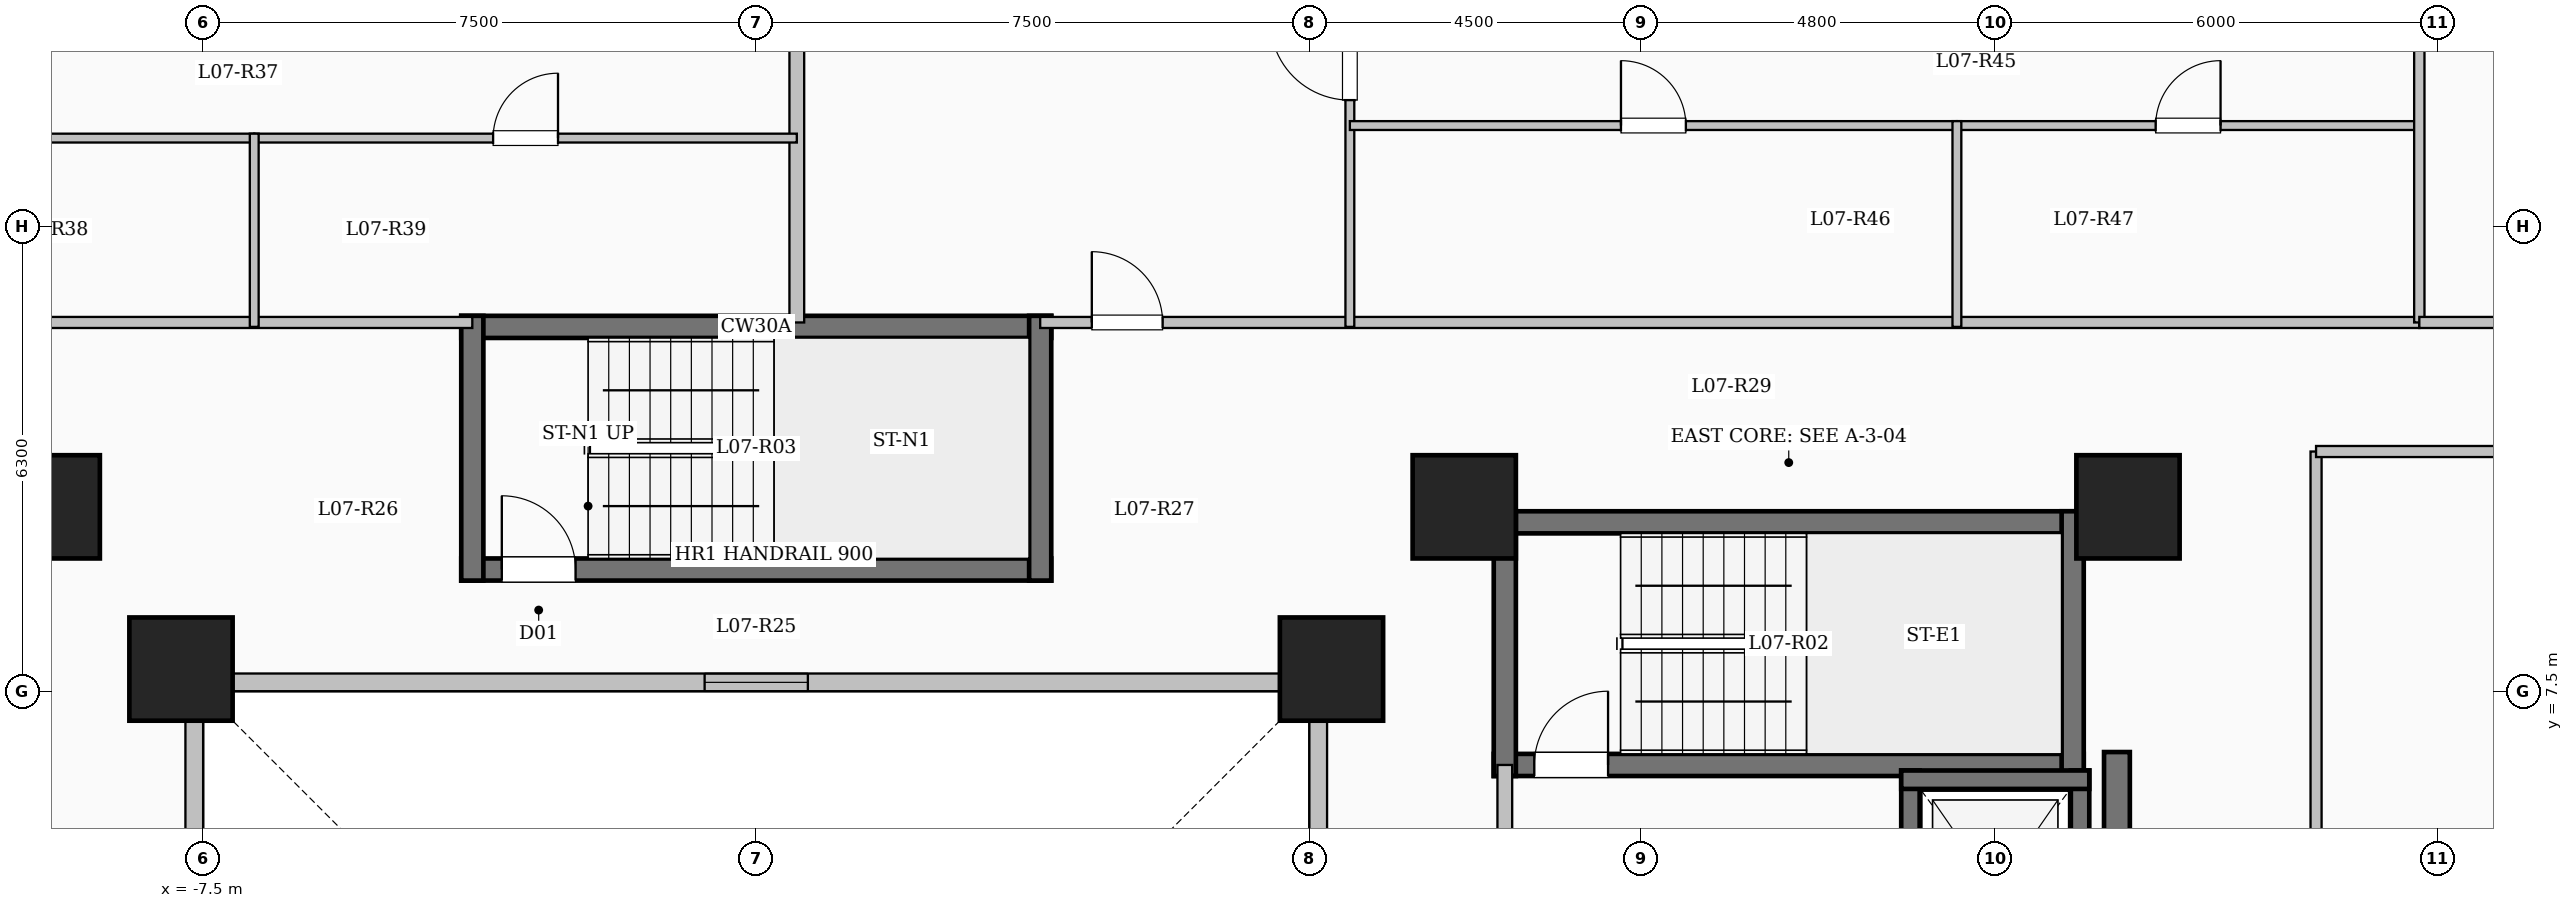
"""IFC4 building model, lengths in metres.
Left out: names, types, materials, properties, quantities, classifications, styles, units other than length and angle.
Written with IfcOpenShell. Run it as: python <this file> out.ifc"""

import sys

from ifc_helpers import new_model, si_unit, direction, frame, frame_2d, origin, origin_2d, place, context, subcontext, project, spatial, rectangle, extrude, element, fill, save


model = new_model("IFC4")
c1 = context("Model", 3, precision=1e-05, world=origin(), true_north=direction((0.0, 1.0)))
c2 = subcontext(c1, "Body", "Model", "MODEL_VIEW")
j1 = project(units=[si_unit("LENGTHUNIT", "METRE"), si_unit("PLANEANGLEUNIT", "RADIAN")], contexts=[c1])
p1 = place(None, origin())
s1 = spatial("IfcSite", under=j1, at=p1, CompositionType="ELEMENT")
p2 = place(p1, origin())
s2 = spatial("IfcBuilding", under=s1, at=p2, CompositionType="ELEMENT")
p3 = place(p2, frame((0.0, 0.0, 30.7)))
s3 = spatial("IfcBuildingStorey", under=s2, at=p3, CompositionType="ELEMENT", Elevation=30.7)
for number, where, z_axis, x_axis in (
    (1, (-7.8, 7.8, 0.0), (0.0, 0.0, 1.0), (1.0, 0.0, 0.0)),
    (2, (7.8, 7.8, 0.0), (0.0, 0.0, 1.0), (1.0, 0.0, 0.0)),
    (3, (-9.6, 10.0, 0.0), (0.0, 0.0, 1.0), (1.0, 0.0, 0.0)),
    (4, (9.6, 10.0, 0.0), (0.0, 0.0, 1.0), (1.0, 0.0, 0.0)),
    (5, (18.6, 10.0, 0.0), (0.0, 0.0, 1.0), (1.0, 0.0, 0.0)),
):
    element("IfcColumn", number, at=place(p3, frame(where, z_axis=z_axis, x_axis=x_axis)), inside=s3, PredefinedType="COLUMN", context=c2, shape_type="SweptSolid", body=[
        extrude(rectangle(XDim=1.4, YDim=1.4, at=origin_2d()), origin(), (0.0, 0.0, 1.0), 3.35),
    ])
p4 = place(p3, frame((7.62, -7.62, 0.0), z_axis=(0.0, 0.0, 1.0), x_axis=(0.0, 1.0, 0.0)))
e6 = element("IfcWall", 6, at=p4, inside=s3, PredefinedType="SOLIDWALL", context=c2, shape_type="SweptSolid", body=[
    extrude(rectangle(XDim=15.24, YDim=0.24, at=frame_2d((7.62, 0.0))), origin(), (0.0, 0.0, 1.0), 3.1),
])
p5 = place(p4, frame((6.92, 0.0, 0.95)))
e7 = element("IfcOpeningElement", 7, at=p5, cuts=e6, PredefinedType="OPENING", context=c2, shape_type="SweptSolid", body=[
    extrude(rectangle(XDim=1.4, YDim=1.5, at=frame_2d((0.7, 0.75))), frame((0.0, 0.13, 0.0), z_axis=(0.0, -1.0, 0.0), x_axis=(1.0, 0.0, 0.0)), (0.0, 0.0, 1.0), 0.26),
])
p6 = place(p3, frame((7.62, 7.62, 0.0), z_axis=(0.0, 0.0, 1.0), x_axis=(-1.0, 0.0, 0.0)))
e8 = element("IfcWall", 8, at=p6, inside=s3, PredefinedType="SOLIDWALL", context=c2, shape_type="SweptSolid", body=[
    extrude(rectangle(XDim=15.24, YDim=0.24, at=frame_2d((7.62, 0.0))), origin(), (0.0, 0.0, 1.0), 3.1),
])
p7 = place(p6, frame((6.92, 0.0, 0.95)))
e9 = element("IfcOpeningElement", 9, at=p7, cuts=e8, PredefinedType="OPENING", context=c2, shape_type="SweptSolid", body=[
    extrude(rectangle(XDim=1.4, YDim=1.5, at=frame_2d((0.7, 0.75))), frame((0.0, 0.13, 0.0), z_axis=(0.0, -1.0, 0.0), x_axis=(1.0, 0.0, 0.0)), (0.0, 0.0, 1.0), 0.26),
])
p8 = place(p3, frame((-7.62, 7.62, 0.0), z_axis=(0.0, 0.0, 1.0), x_axis=(0.0, -1.0, 0.0)))
e10 = element("IfcWall", 10, at=p8, inside=s3, PredefinedType="SOLIDWALL", context=c2, shape_type="SweptSolid", body=[
    extrude(rectangle(XDim=15.24, YDim=0.24, at=frame_2d((7.62, 0.0))), origin(), (0.0, 0.0, 1.0), 3.1),
])
p9 = place(p8, frame((6.92, 0.0, 0.95)))
e11 = element("IfcOpeningElement", 11, at=p9, cuts=e10, PredefinedType="OPENING", context=c2, shape_type="SweptSolid", body=[
    extrude(rectangle(XDim=1.4, YDim=1.5, at=frame_2d((0.7, 0.75))), frame((0.0, 0.13, 0.0), z_axis=(0.0, -1.0, 0.0), x_axis=(1.0, 0.0, 0.0)), (0.0, 0.0, 1.0), 0.26),
])
p10 = place(p3, frame((10.0, 9.79, 0.0), z_axis=(0.0, 0.0, 1.0), x_axis=(1.0, 0.0, 0.0)))
e12 = element("IfcWall", 12, at=p10, inside=s3, PredefinedType="SHEAR", context=c2, shape_type="SweptSolid", body=[
    extrude(rectangle(XDim=8.0, YDim=0.3, at=frame_2d((4.0, 0.0))), origin(), (0.0, 0.0, 1.0), 3.35),
])
p11 = place(p3, frame((10.0, 6.5, 0.0), z_axis=(0.0, 0.0, 1.0), x_axis=(1.0, 0.0, 0.0)))
e13 = element("IfcWall", 13, at=p11, inside=s3, PredefinedType="SHEAR", context=c2, shape_type="SweptSolid", body=[
    extrude(rectangle(XDim=8.0, YDim=0.3, at=frame_2d((4.0, 0.0))), origin(), (0.0, 0.0, 1.0), 3.35),
])
p12 = place(p11, frame((0.55, 0.0, 0.0)))
e14 = element("IfcOpeningElement", 14, at=p12, cuts=e13, PredefinedType="OPENING", context=c2, shape_type="SweptSolid", body=[
    extrude(rectangle(XDim=1.0, YDim=2.15, at=frame_2d((0.5, 1.075))), frame((0.0, 0.16, 0.0), z_axis=(0.0, -1.0, 0.0), x_axis=(1.0, 0.0, 0.0)), (0.0, 0.0, 1.0), 0.32),
])
for number, where, z_axis, x_axis in (
    (15, (10.15, 6.35, 0.0), (0.0, 0.0, 1.0), (0.0, 1.0, 0.0)),
    (16, (17.85, 6.35, 0.0), (0.0, 0.0, 1.0), (0.0, 1.0, 0.0)),
):
    element("IfcWall", number, at=place(p3, frame(where, z_axis=z_axis, x_axis=x_axis)), inside=s3, PredefinedType="SHEAR", context=c2, shape_type="SweptSolid", body=[
        extrude(rectangle(XDim=3.59, YDim=0.3, at=frame_2d((1.795, 0.0))), origin(), (0.0, 0.0, 1.0), 3.35),
    ])
p13 = place(p3, frame((-4.0, 12.44, 0.0), z_axis=(0.0, 0.0, 1.0), x_axis=(1.0, 0.0, 0.0)))
e17 = element("IfcWall", 17, at=p13, inside=s3, PredefinedType="SHEAR", context=c2, shape_type="SweptSolid", body=[
    extrude(rectangle(XDim=8.0, YDim=0.3, at=frame_2d((4.0, 0.0))), origin(), (0.0, 0.0, 1.0), 3.35),
])
p14 = place(p3, frame((-4.0, 9.15, 0.0), z_axis=(0.0, 0.0, 1.0), x_axis=(1.0, 0.0, 0.0)))
e18 = element("IfcWall", 18, at=p14, inside=s3, PredefinedType="SHEAR", context=c2, shape_type="SweptSolid", body=[
    extrude(rectangle(XDim=8.0, YDim=0.3, at=frame_2d((4.0, 0.0))), origin(), (0.0, 0.0, 1.0), 3.35),
])
p15 = place(p14, frame((0.55, 0.0, 0.0)))
e19 = element("IfcOpeningElement", 19, at=p15, cuts=e18, PredefinedType="OPENING", context=c2, shape_type="SweptSolid", body=[
    extrude(rectangle(XDim=1.0, YDim=2.15, at=frame_2d((0.5, 1.075))), frame((0.0, 0.16, 0.0), z_axis=(0.0, -1.0, 0.0), x_axis=(1.0, 0.0, 0.0)), (0.0, 0.0, 1.0), 0.32),
])
for number, where, z_axis, x_axis in (
    (20, (-3.85, 9.0, 0.0), (0.0, 0.0, 1.0), (0.0, 1.0, 0.0)),
    (21, (3.85, 9.0, 0.0), (0.0, 0.0, 1.0), (0.0, 1.0, 0.0)),
):
    element("IfcWall", number, at=place(p3, frame(where, z_axis=z_axis, x_axis=x_axis)), inside=s3, PredefinedType="SHEAR", context=c2, shape_type="SweptSolid", body=[
        extrude(rectangle(XDim=3.59, YDim=0.3, at=frame_2d((1.795, 0.0))), origin(), (0.0, 0.0, 1.0), 3.35),
    ])
p16 = place(p3, frame((10.15, 3.25, 0.0), z_axis=(0.0, 0.0, 1.0), x_axis=(0.0, 1.0, 0.0)))
e22 = element("IfcWall", 22, at=p16, inside=s3, PredefinedType="SOLIDWALL", context=c2, shape_type="SweptSolid", body=[
    extrude(rectangle(XDim=3.25, YDim=0.2, at=frame_2d((1.625, 0.0))), origin(), (0.0, 0.0, 1.0), 3.1),
])
p17 = place(p16, frame((1.1, 0.0, 0.0)))
e23 = element("IfcOpeningElement", 23, at=p17, cuts=e22, PredefinedType="OPENING", context=c2, shape_type="SweptSolid", body=[
    extrude(rectangle(XDim=1.02, YDim=2.15, at=frame_2d((0.51, 1.075))), frame((0.0, 0.11, 0.0), z_axis=(0.0, -1.0, 0.0), x_axis=(1.0, 0.0, 0.0)), (0.0, 0.0, 1.0), 0.22),
])
p18 = place(p3, frame((15.65, 3.175, 0.0), z_axis=(0.0, 0.0, 1.0), x_axis=(0.0, 1.0, 0.0)))
e24 = element("IfcWall", 24, at=p18, inside=s3, PredefinedType="SHEAR", context=c2, shape_type="SweptSolid", body=[
    extrude(rectangle(XDim=3.25, YDim=0.25, at=frame_2d((1.625, 0.0))), origin(), (0.0, 0.0, 1.0), 3.35),
])
p19 = place(p18, frame((1.075, 0.0, 0.0)))
e25 = element("IfcOpeningElement", 25, at=p19, cuts=e24, PredefinedType="OPENING", context=c2, shape_type="SweptSolid", body=[
    extrude(rectangle(XDim=1.1, YDim=2.15, at=frame_2d((0.55, 1.075))), frame((0.0, 0.135, 0.0), z_axis=(0.0, -1.0, 0.0), x_axis=(1.0, 0.0, 0.0)), (0.0, 0.0, 1.0), 0.27),
])
p20 = place(p3, frame((17.95, 3.175, 0.0), z_axis=(0.0, 0.0, 1.0), x_axis=(0.0, 1.0, 0.0)))
e26 = element("IfcWall", 26, at=p20, inside=s3, PredefinedType="SHEAR", context=c2, shape_type="SweptSolid", body=[
    extrude(rectangle(XDim=3.25, YDim=0.25, at=frame_2d((1.625, 0.0))), origin(), (0.0, 0.0, 1.0), 3.35),
])
p21 = place(p3, frame((15.525, 6.3, 0.0), z_axis=(0.0, 0.0, 1.0), x_axis=(1.0, 0.0, 0.0)))
e27 = element("IfcWall", 27, at=p21, inside=s3, PredefinedType="SHEAR", context=c2, shape_type="SweptSolid", body=[
    extrude(rectangle(XDim=2.55, YDim=0.25, at=frame_2d((1.275, 0.0))), origin(), (0.0, 0.0, 1.0), 3.35),
])
p22 = place(p3, frame((18.45, -7.375, 0.0), z_axis=(0.0, 0.0, 1.0), x_axis=(0.0, 1.0, 0.0)))
e28 = element("IfcWall", 28, at=p22, inside=s3, PredefinedType="SHEAR", context=c2, shape_type="SweptSolid", body=[
    extrude(rectangle(XDim=14.05, YDim=0.35, at=frame_2d((7.025, 0.0))), origin(), (0.0, 0.0, 1.0), 3.35),
])
p23 = place(p3, frame((-22.55, 12.5, 0.0), z_axis=(0.0, 0.0, 1.0), x_axis=(1.0, 0.0, 0.0)))
e29 = element("IfcWall", 29, at=p23, inside=s3, PredefinedType="PARTITIONING", context=c2, shape_type="SweptSolid", body=[
    extrude(rectangle(XDim=18.7, YDim=0.15, at=frame_2d((9.35, 0.0))), origin(), (0.0, 0.0, 1.0), 3.1),
])
p24 = place(p23, frame((0.7, 0.0, 0.0)))
e30 = element("IfcOpeningElement", 30, at=p24, cuts=e29, PredefinedType="OPENING", context=c2, shape_type="SweptSolid", body=[
    extrude(rectangle(XDim=0.96, YDim=2.15, at=frame_2d((0.48, 1.075))), frame((0.0, 0.085, 0.0), z_axis=(0.0, -1.0, 0.0), x_axis=(1.0, 0.0, 0.0)), (0.0, 0.0, 1.0), 0.17),
])
p25 = place(p3, frame((3.85, 12.5, 0.0), z_axis=(0.0, 0.0, 1.0), x_axis=(1.0, 0.0, 0.0)))
e31 = element("IfcWall", 31, at=p25, inside=s3, PredefinedType="PARTITIONING", context=c2, shape_type="SweptSolid", body=[
    extrude(rectangle(XDim=18.7, YDim=0.15, at=frame_2d((9.35, 0.0))), origin(), (0.0, 0.0, 1.0), 3.1),
])
p26 = place(p25, frame((0.7, 0.0, 0.0)))
e32 = element("IfcOpeningElement", 32, at=p26, cuts=e31, PredefinedType="OPENING", context=c2, shape_type="SweptSolid", body=[
    extrude(rectangle(XDim=0.96, YDim=2.15, at=frame_2d((0.48, 1.075))), frame((0.0, 0.085, 0.0), z_axis=(0.0, -1.0, 0.0), x_axis=(1.0, 0.0, 0.0)), (0.0, 0.0, 1.0), 0.17),
])
p27 = place(p3, frame((21.15, -7.25, 0.0), z_axis=(0.0, 0.0, 1.0), x_axis=(0.0, 1.0, 0.0)))
e33 = element("IfcWall", 33, at=p27, inside=s3, PredefinedType="PARTITIONING", context=c2, shape_type="SweptSolid", body=[
    extrude(rectangle(XDim=18.0, YDim=0.15, at=frame_2d((9.0, 0.0))), origin(), (0.0, 0.0, 1.0), 2.585),
])
p28 = place(p3, frame((0.55, 12.5, 0.0), z_axis=(0.0, 0.0, 1.0), x_axis=(0.0, 1.0, 0.0)))
e34 = element("IfcWall", 34, at=p28, inside=s3, PredefinedType="SOLIDWALL", context=c2, shape_type="SweptSolid", body=[
    extrude(rectangle(XDim=12.58, YDim=0.2, at=frame_2d((6.29, 0.0))), origin(), (0.0, 0.0, 1.0), 3.1),
])
p29 = place(p3, frame((-15.035, 15.0, 0.0), z_axis=(0.0, 0.0, 1.0), x_axis=(1.0, 0.0, 0.0)))
e35 = element("IfcWall", 35, at=p29, inside=s3, PredefinedType="PARTITIONING", context=c2, shape_type="SweptSolid", body=[
    extrude(rectangle(XDim=8.228, YDim=0.12, at=frame_2d((4.114, 0.0))), origin(), (0.0, 0.0, 1.0), 2.585),
])
p30 = place(p29, frame((3.674, 0.0, 0.0)))
e36 = element("IfcOpeningElement", 36, at=p30, cuts=e35, PredefinedType="OPENING", context=c2, shape_type="SweptSolid", body=[
    extrude(rectangle(XDim=0.88, YDim=2.1, at=frame_2d((0.44, 1.05))), frame((0.0, 0.07, 0.0), z_axis=(0.0, -1.0, 0.0), x_axis=(1.0, 0.0, 0.0)), (0.0, 0.0, 1.0), 0.14),
])
p31 = place(p3, frame((-6.807, 15.0, 0.0), z_axis=(0.0, 0.0, 1.0), x_axis=(1.0, 0.0, 0.0)))
e37 = element("IfcWall", 37, at=p31, inside=s3, PredefinedType="PARTITIONING", context=c2, shape_type="SweptSolid", body=[
    extrude(rectangle(XDim=7.357, YDim=0.12, at=frame_2d((3.678, 0.0))), origin(), (0.0, 0.0, 1.0), 2.585),
])
p32 = place(p31, frame((3.239, 0.0, 0.0)))
e38 = element("IfcOpeningElement", 38, at=p32, cuts=e37, PredefinedType="OPENING", context=c2, shape_type="SweptSolid", body=[
    extrude(rectangle(XDim=0.88, YDim=2.1, at=frame_2d((0.44, 1.05))), frame((0.0, 0.07, 0.0), z_axis=(0.0, -1.0, 0.0), x_axis=(1.0, 0.0, 0.0)), (0.0, 0.0, 1.0), 0.14),
])
p33 = place(p3, frame((-6.807, 12.44, 0.0), z_axis=(0.0, 0.0, 1.0), x_axis=(0.0, 1.0, 0.0)))
e39 = element("IfcWall", 39, at=p33, inside=s3, PredefinedType="PARTITIONING", context=c2, shape_type="SweptSolid", body=[
    extrude(rectangle(XDim=2.62, YDim=0.12, at=frame_2d((1.31, 0.0))), origin(), (0.0, 0.0, 1.0), 3.1),
])
p34 = place(p3, frame((8.049, 12.44, 0.0), z_axis=(0.0, 0.0, 1.0), x_axis=(0.0, 1.0, 0.0)))
e40 = element("IfcWall", 40, at=p34, inside=s3, PredefinedType="PARTITIONING", context=c2, shape_type="SweptSolid", body=[
    extrude(rectangle(XDim=11.888, YDim=0.12, at=frame_2d((5.944, 0.0))), origin(), (0.0, 0.0, 1.0), 2.435),
])
p35 = place(p34, frame((3.075, 0.0, 0.0)))
e41 = element("IfcOpeningElement", 41, at=p35, cuts=e40, PredefinedType="OPENING", context=c2, shape_type="SweptSolid", body=[
    extrude(rectangle(XDim=1.08, YDim=2.15, at=frame_2d((0.54, 1.075))), frame((0.0, 0.07, 0.0), z_axis=(0.0, -1.0, 0.0), x_axis=(1.0, 0.0, 0.0)), (0.0, 0.0, 1.0), 0.14),
])
p36 = place(p3, frame((8.049, 15.17, 0.0), z_axis=(0.0, 0.0, 1.0), x_axis=(1.0, 0.0, 0.0)))
e42 = element("IfcWall", 42, at=p36, inside=s3, PredefinedType="PARTITIONING", context=c2, shape_type="SweptSolid", body=[
    extrude(rectangle(XDim=8.231, YDim=0.12, at=frame_2d((4.115, 0.0))), origin(), (0.0, 0.0, 1.0), 3.1),
])
p37 = place(p36, frame((3.676, 0.0, 0.0)))
e43 = element("IfcOpeningElement", 43, at=p37, cuts=e42, PredefinedType="OPENING", context=c2, shape_type="SweptSolid", body=[
    extrude(rectangle(XDim=0.88, YDim=2.1, at=frame_2d((0.44, 1.05))), frame((0.0, 0.07, 0.0), z_axis=(0.0, -1.0, 0.0), x_axis=(1.0, 0.0, 0.0)), (0.0, 0.0, 1.0), 0.14),
])
p38 = place(p3, frame((16.28, 15.17, 0.0), z_axis=(0.0, 0.0, 1.0), x_axis=(1.0, 0.0, 0.0)))
e44 = element("IfcWall", 44, at=p38, inside=s3, PredefinedType="PARTITIONING", context=c2, shape_type="SweptSolid", body=[
    extrude(rectangle(XDim=6.27, YDim=0.12, at=frame_2d((3.135, 0.0))), origin(), (0.0, 0.0, 1.0), 3.1),
])
p39 = place(p38, frame((2.695, 0.0, 0.0)))
e45 = element("IfcOpeningElement", 45, at=p39, cuts=e44, PredefinedType="OPENING", context=c2, shape_type="SweptSolid", body=[
    extrude(rectangle(XDim=0.88, YDim=2.1, at=frame_2d((0.44, 1.05))), frame((0.0, 0.07, 0.0), z_axis=(0.0, -1.0, 0.0), x_axis=(1.0, 0.0, 0.0)), (0.0, 0.0, 1.0), 0.14),
])
p40 = place(p3, frame((16.28, 12.44, 0.0), z_axis=(0.0, 0.0, 1.0), x_axis=(0.0, 1.0, 0.0)))
e46 = element("IfcWall", 46, at=p40, inside=s3, PredefinedType="PARTITIONING", context=c2, shape_type="SweptSolid", body=[
    extrude(rectangle(XDim=2.79, YDim=0.12, at=frame_2d((1.395, 0.0))), origin(), (0.0, 0.0, 1.0), 3.1),
])
p41 = place(p3, frame((21.15, 10.75, 0.0), z_axis=(0.0, 0.0, 1.0), x_axis=(1.0, 0.0, 0.0)))
e47 = element("IfcWall", 47, at=p41, inside=s3, PredefinedType="PARTITIONING", context=c2, shape_type="SweptSolid", body=[
    extrude(rectangle(XDim=7.53, YDim=0.15, at=frame_2d((3.765, 0.0))), origin(), (0.0, 0.0, 1.0), 3.1),
])
p42 = place(p3, frame((22.55, 12.5, 0.0), z_axis=(0.0, 0.0, 1.0), x_axis=(0.0, 1.0, 0.0)))
e48 = element("IfcWall", 48, at=p42, inside=s3, PredefinedType="PARTITIONING", context=c2, shape_type="SweptSolid", body=[
    extrude(rectangle(XDim=6.55, YDim=0.14, at=frame_2d((3.275, 0.0))), origin(), (0.0, 0.0, 1.0), 3.1),
])
p43 = place(p3, frame((22.55, 12.5, 0.0), z_axis=(0.0, 0.0, 1.0), x_axis=(1.0, 0.0, 0.0)))
e49 = element("IfcWall", 49, at=p43, inside=s3, PredefinedType="PARTITIONING", context=c2, shape_type="SweptSolid", body=[
    extrude(rectangle(XDim=6.13, YDim=0.15, at=frame_2d((3.065, 0.0))), origin(), (0.0, 0.0, 1.0), 3.1),
])
p44 = place(p43, frame((2.59, 0.0, 0.0)))
e50 = element("IfcOpeningElement", 50, at=p44, cuts=e49, PredefinedType="OPENING", context=c2, shape_type="SweptSolid", body=[
    extrude(rectangle(XDim=0.95, YDim=2.15, at=frame_2d((0.475, 1.075))), frame((0.0, 0.085, 0.0), z_axis=(0.0, -1.0, 0.0), x_axis=(1.0, 0.0, 0.0)), (0.0, 0.0, 1.0), 0.17),
])
p45 = place(p7, origin())
e51 = element("IfcWindow", 51, at=p45, inside=s3, PartitioningType="SINGLE_PANEL", PredefinedType="WINDOW", context=c2, shape_type="SweptSolid", body=[
    extrude(rectangle(XDim=1.4, YDim=1.5, at=frame_2d((0.7, 0.75))), frame((0.0, 0.03, 0.0), z_axis=(0.0, -1.0, 0.0), x_axis=(1.0, 0.0, 0.0)), (0.0, 0.0, 1.0), 0.06),
])
fill(e9, e51)
p46 = place(p12, origin())
e52 = element("IfcDoor", 52, at=p46, inside=s3, OperationType="SINGLE_SWING_RIGHT", PredefinedType="DOOR", context=c2, shape_type="SweptSolid", body=[
    extrude(rectangle(XDim=1.0, YDim=2.15, at=frame_2d((0.5, 1.075))), frame((0.0, 0.025, 0.0), z_axis=(0.0, -1.0, 0.0), x_axis=(1.0, 0.0, 0.0)), (0.0, 0.0, 1.0), 0.05),
])
fill(e14, e52)
p47 = place(p15, origin())
e53 = element("IfcDoor", 53, at=p47, inside=s3, OperationType="SINGLE_SWING_LEFT", PredefinedType="DOOR", context=c2, shape_type="SweptSolid", body=[
    extrude(rectangle(XDim=1.0, YDim=2.15, at=frame_2d((0.5, 1.075))), frame((0.0, 0.025, 0.0), z_axis=(0.0, -1.0, 0.0), x_axis=(1.0, 0.0, 0.0)), (0.0, 0.0, 1.0), 0.05),
])
fill(e19, e53)
p48 = place(p32, origin())
e54 = element("IfcDoor", 54, at=p48, inside=s3, OperationType="SINGLE_SWING_RIGHT", PredefinedType="DOOR", context=c2, shape_type="SweptSolid", body=[
    extrude(rectangle(XDim=0.88, YDim=2.1, at=frame_2d((0.44, 1.05))), frame((0.0, 0.025, 0.0), z_axis=(0.0, -1.0, 0.0), x_axis=(1.0, 0.0, 0.0)), (0.0, 0.0, 1.0), 0.05),
])
fill(e38, e54)
p49 = place(p26, origin())
e55 = element("IfcDoor", 55, at=p49, inside=s3, OperationType="SINGLE_SWING_LEFT", PredefinedType="DOOR", context=c2, shape_type="SweptSolid", body=[
    extrude(rectangle(XDim=0.96, YDim=2.15, at=frame_2d((0.48, 1.075))), frame((0.0, 0.025, 0.0), z_axis=(0.0, -1.0, 0.0), x_axis=(1.0, 0.0, 0.0)), (0.0, 0.0, 1.0), 0.05),
])
fill(e32, e55)
p50 = place(p35, origin())
e56 = element("IfcDoor", 56, at=p50, inside=s3, OperationType="SINGLE_SWING_RIGHT", PredefinedType="DOOR", context=c2, shape_type="SweptSolid", body=[
    extrude(rectangle(XDim=1.08, YDim=2.15, at=frame_2d((0.54, 1.075))), frame((0.0, 0.025, 0.0), z_axis=(0.0, -1.0, 0.0), x_axis=(1.0, 0.0, 0.0)), (0.0, 0.0, 1.0), 0.05),
])
fill(e41, e56)
p51 = place(p37, origin())
e57 = element("IfcDoor", 57, at=p51, inside=s3, OperationType="SINGLE_SWING_LEFT", PredefinedType="DOOR", context=c2, shape_type="SweptSolid", body=[
    extrude(rectangle(XDim=0.88, YDim=2.1, at=frame_2d((0.44, 1.05))), frame((0.0, 0.025, 0.0), z_axis=(0.0, -1.0, 0.0), x_axis=(1.0, 0.0, 0.0)), (0.0, 0.0, 1.0), 0.05),
])
fill(e43, e57)
p52 = place(p39, origin())
e58 = element("IfcDoor", 58, at=p52, inside=s3, OperationType="SINGLE_SWING_RIGHT", PredefinedType="DOOR", context=c2, shape_type="SweptSolid", body=[
    extrude(rectangle(XDim=0.88, YDim=2.1, at=frame_2d((0.44, 1.05))), frame((0.0, 0.025, 0.0), z_axis=(0.0, -1.0, 0.0), x_axis=(1.0, 0.0, 0.0)), (0.0, 0.0, 1.0), 0.05),
])
fill(e45, e58)
save(model, sys.argv[1])
